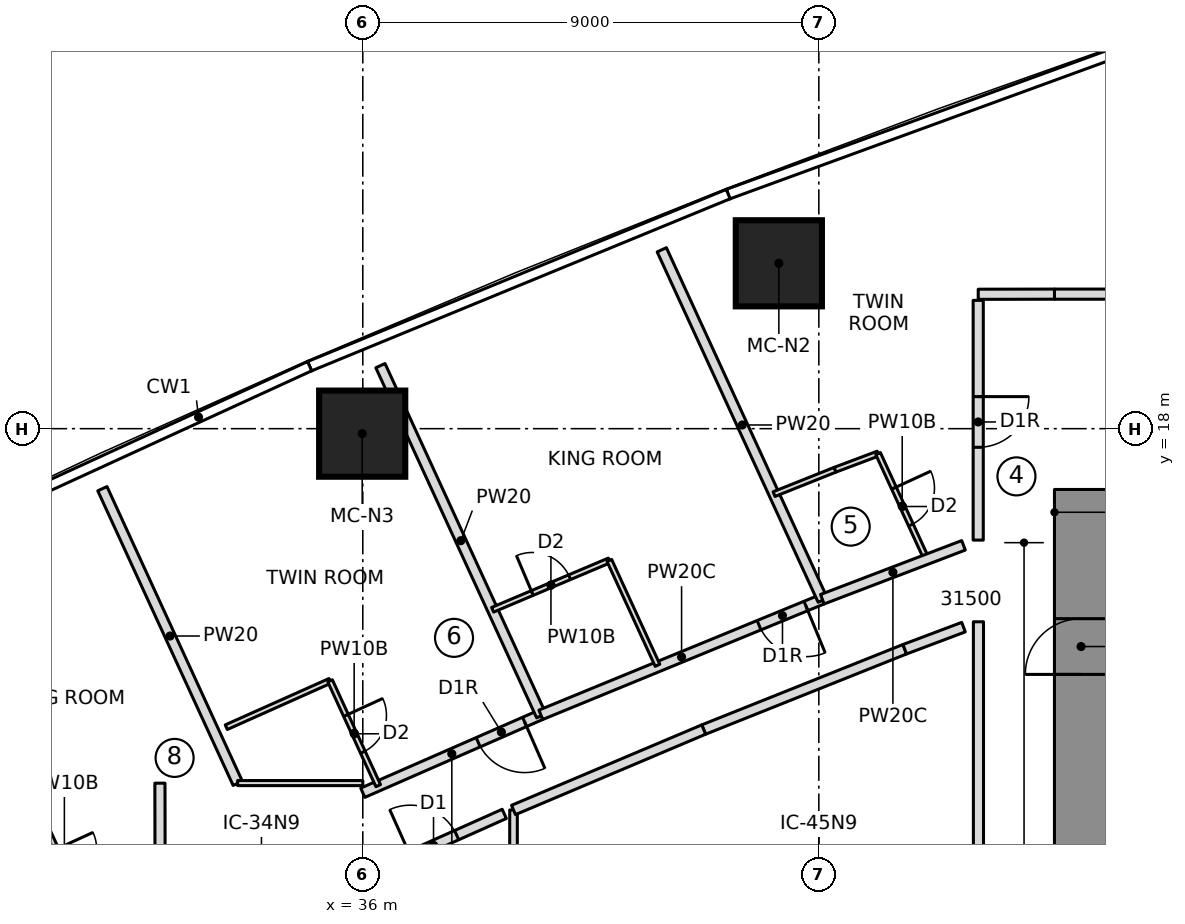
"""IFC4 building model, lengths in metres.
Left out: names, types, materials, properties, quantities, classifications, styles, units other than length and angle.
Written with IfcOpenShell. Run it as: python <this file> out.ifc"""

import sys

from ifc_helpers import new_model, si_unit, direction, frame, frame_2d, origin, origin_2d, place, context, subcontext, project, spatial, rectangle, extrude, element, fill, save


model = new_model("IFC4")
c1 = context("Model", 3, precision=1e-05, world=origin(), true_north=direction((0.0, 1.0)))
c2 = subcontext(c1, "Body", "Model", "MODEL_VIEW")
j1 = project(units=[si_unit("LENGTHUNIT", "METRE"), si_unit("PLANEANGLEUNIT", "RADIAN")], contexts=[c1])
p1 = place(None, origin())
s1 = spatial("IfcSite", under=j1, at=p1, CompositionType="ELEMENT")
p2 = place(p1, origin())
s2 = spatial("IfcBuilding", under=s1, at=p2, CompositionType="ELEMENT")
p3 = place(p2, frame((0.0, 0.0, 109.75)))
s3 = spatial("IfcBuildingStorey", under=s2, at=p3, CompositionType="ELEMENT", Elevation=109.75)
p4 = place(p3, frame((50.175, 6.65, 0.0), z_axis=(0.0, 0.0, 1.0), x_axis=(0.0, 1.0, 0.0)))
e1 = element("IfcWall", 1, at=p4, inside=s3, PredefinedType="SHEAR", context=c2, shape_type="SweptSolid", body=[
    extrude(rectangle(XDim=10.15, YDim=1.05, at=frame_2d((5.075, 0.0))), origin(), (0.0, 0.0, 1.0), 3.55),
])
p5 = place(p4, frame((6.5, 0.0, 0.0)))
e2 = element("IfcOpeningElement", 2, at=p5, cuts=e1, PredefinedType="OPENING", context=c2, shape_type="SweptSolid", body=[
    extrude(rectangle(XDim=1.1, YDim=2.1, at=frame_2d((0.55, 1.05))), frame((0.0, 0.535, 0.0), z_axis=(0.0, -1.0, 0.0), x_axis=(1.0, 0.0, 0.0)), (0.0, 0.0, 1.0), 1.07),
])
for number, where, z_axis, x_axis in (
    (3, (44.211, 21.264, 0.0), (0.0, 0.0, 1.0), (1.0, 0.0, 0.0)),
    (4, (35.988, 17.902, 0.0), (0.0, 0.0, 1.0), (1.0, 0.0, 0.0)),
):
    element("IfcColumn", number, at=place(p3, frame(where, z_axis=z_axis, x_axis=x_axis)), inside=s3, PredefinedType="COLUMN", context=c2, shape_type="SweptSolid", body=[
        extrude(rectangle(XDim=1.7, YDim=1.7, at=origin_2d()), origin(), (0.0, 0.0, 1.0), 3.55),
    ])
p6 = place(p3, frame((29.635, 10.38, 0.0), z_axis=(0.0, 0.0, 1.0), x_axis=(0.417466676952, -0.908692232626, 0.0)))
e5 = element("IfcWall", 5, at=p6, inside=s3, PredefinedType="PARTITIONING", context=c2, shape_type="SweptSolid", body=[
    extrude(rectangle(XDim=2.277, YDim=0.1, at=frame_2d((1.139, 0.0))), origin(), (0.0, 0.0, 1.0), 3.25),
])
p7 = place(p6, frame((0.75, 0.0, 0.0)))
e6 = element("IfcOpeningElement", 6, at=p7, cuts=e5, PredefinedType="OPENING", context=c2, shape_type="SweptSolid", body=[
    extrude(rectangle(XDim=0.8, YDim=2.1, at=frame_2d((0.4, 1.05))), frame((0.0, 0.06, 0.0), z_axis=(0.0, -1.0, 0.0), x_axis=(1.0, 0.0, 0.0)), (0.0, 0.0, 1.0), 0.12),
])
p8 = place(p3, frame((33.532, 11.0, 0.0), z_axis=(0.0, 0.0, 1.0), x_axis=(-0.417441426461, 0.908703832651, 0.0)))
e7 = element("IfcWall", 7, at=p8, inside=s3, PredefinedType="PARTITIONING", context=c2, shape_type="SweptSolid", body=[
    extrude(rectangle(XDim=6.399, YDim=0.2, at=frame_2d((3.2, 0.0))), origin(), (0.0, 0.0, 1.0), 3.25),
])
p9 = place(p3, frame((39.514, 12.353, 0.0), z_axis=(0.0, 0.0, 1.0), x_axis=(-0.916085742373, -0.400982434305, 0.0)))
e8 = element("IfcWall", 8, at=p9, inside=s3, PredefinedType="PARTITIONING", context=c2, shape_type="SweptSolid", body=[
    extrude(rectangle(XDim=3.836, YDim=0.2, at=frame_2d((1.918, 0.0))), origin(), (0.0, 0.0, 1.0), 3.25),
])
p10 = place(p9, frame((0.35, 0.0, 0.0)))
e9 = element("IfcOpeningElement", 9, at=p10, cuts=e8, PredefinedType="OPENING", context=c2, shape_type="SweptSolid", body=[
    extrude(rectangle(XDim=1.0, YDim=2.1, at=frame_2d((0.5, 1.05))), frame((0.0, 0.11, 0.0), z_axis=(0.0, -1.0, 0.0), x_axis=(1.0, 0.0, 0.0)), (0.0, 0.0, 1.0), 0.22),
])
p11 = place(p3, frame((33.306, 12.108, 0.0), z_axis=(0.0, 0.0, 1.0), x_axis=(0.913060453705, 0.407824236504, 0.0)))
e10 = element("IfcWall", 10, at=p11, inside=s3, PredefinedType="PARTITIONING", context=c2, shape_type="SweptSolid", body=[
    extrude(rectangle(XDim=2.243, YDim=0.1, at=frame_2d((1.122, 0.0))), origin(), (0.0, 0.0, 1.0), 3.25),
])
p12 = place(p3, frame((35.354, 13.023, 0.0), z_axis=(0.0, 0.0, 1.0), x_axis=(0.41750734959, -0.908673545911, 0.0)))
e11 = element("IfcWall", 11, at=p12, inside=s3, PredefinedType="PARTITIONING", context=c2, shape_type="SweptSolid", body=[
    extrude(rectangle(XDim=2.277, YDim=0.1, at=frame_2d((1.139, 0.0))), origin(), (0.0, 0.0, 1.0), 3.25),
])
p13 = place(p12, frame((0.75, 0.0, 0.0)))
e12 = element("IfcOpeningElement", 12, at=p13, cuts=e11, PredefinedType="OPENING", context=c2, shape_type="SweptSolid", body=[
    extrude(rectangle(XDim=0.8, YDim=2.1, at=frame_2d((0.4, 1.05))), frame((0.0, 0.06, 0.0), z_axis=(0.0, -1.0, 0.0), x_axis=(1.0, 0.0, 0.0)), (0.0, 0.0, 1.0), 0.12),
])
p14 = place(p3, frame((39.522, 12.334, 0.0), z_axis=(0.0, 0.0, 1.0), x_axis=(-0.417442847913, 0.908703179661, 0.0)))
e13 = element("IfcWall", 13, at=p14, inside=s3, PredefinedType="PARTITIONING", context=c2, shape_type="SweptSolid", body=[
    extrude(rectangle(XDim=7.604, YDim=0.2, at=frame_2d((3.802, 0.0))), origin(), (0.0, 0.0, 1.0), 3.25),
])
p15 = place(p3, frame((45.069, 14.634, 0.0), z_axis=(0.0, 0.0, 1.0), x_axis=(-0.925062421694, -0.379815107611, 0.0)))
e14 = element("IfcWall", 14, at=p15, inside=s3, PredefinedType="PARTITIONING", context=c2, shape_type="SweptSolid", body=[
    extrude(rectangle(XDim=6.005, YDim=0.2, at=frame_2d((3.002, 0.0))), origin(), (0.0, 0.0, 1.0), 3.25),
])
p16 = place(p15, frame((0.35, 0.0, 0.0)))
e15 = element("IfcOpeningElement", 15, at=p16, cuts=e14, PredefinedType="OPENING", context=c2, shape_type="SweptSolid", body=[
    extrude(rectangle(XDim=1.0, YDim=2.1, at=frame_2d((0.5, 1.05))), frame((0.0, 0.11, 0.0), z_axis=(0.0, -1.0, 0.0), x_axis=(1.0, 0.0, 0.0)), (0.0, 0.0, 1.0), 0.22),
])
p17 = place(p3, frame((38.562, 14.426, 0.0), z_axis=(0.0, 0.0, 1.0), x_axis=(0.921042675983, 0.38946166566, 0.0)))
e16 = element("IfcWall", 16, at=p17, inside=s3, PredefinedType="PARTITIONING", context=c2, shape_type="SweptSolid", body=[
    extrude(rectangle(XDim=2.501, YDim=0.1, at=frame_2d((1.25, 0.0))), origin(), (0.0, 0.0, 1.0), 3.25),
])
p18 = place(p17, frame((0.85, 0.0, 0.0)))
e17 = element("IfcOpeningElement", 17, at=p18, cuts=e16, PredefinedType="OPENING", context=c2, shape_type="SweptSolid", body=[
    extrude(rectangle(XDim=0.8, YDim=2.1, at=frame_2d((0.4, 1.05))), frame((0.0, 0.06, 0.0), z_axis=(0.0, -1.0, 0.0), x_axis=(1.0, 0.0, 0.0)), (0.0, 0.0, 1.0), 0.12),
])
p19 = place(p3, frame((40.865, 15.4, 0.0), z_axis=(0.0, 0.0, 1.0), x_axis=(0.417433204355, -0.908707609686, 0.0)))
e18 = element("IfcWall", 18, at=p19, inside=s3, PredefinedType="PARTITIONING", context=c2, shape_type="SweptSolid", body=[
    extrude(rectangle(XDim=2.278, YDim=0.1, at=frame_2d((1.139, 0.0))), origin(), (0.0, 0.0, 1.0), 3.25),
])
p20 = place(p3, frame((45.077, 14.615, 0.0), z_axis=(0.0, 0.0, 1.0), x_axis=(-0.417427858403, 0.908710065438, 0.0)))
e19 = element("IfcWall", 19, at=p20, inside=s3, PredefinedType="PARTITIONING", context=c2, shape_type="SweptSolid", body=[
    extrude(rectangle(XDim=7.61, YDim=0.2, at=frame_2d((3.805, 0.0))), origin(), (0.0, 0.0, 1.0), 3.25),
])
p21 = place(p3, frame((44.116, 16.708, 0.0), z_axis=(0.0, 0.0, 1.0), x_axis=(0.928593389657, 0.371098796393, 0.0)))
e20 = element("IfcWall", 20, at=p21, inside=s3, PredefinedType="PARTITIONING", context=c2, shape_type="SweptSolid", body=[
    extrude(rectangle(XDim=1.298, YDim=0.1, at=frame_2d((0.649, 0.0))), origin(), (0.0, 0.0, 1.0), 3.25),
])
p22 = place(p3, frame((45.321, 17.19, 0.0), z_axis=(0.0, 0.0, 1.0), x_axis=(0.935885332459, 0.352304760808, 0.0)))
e21 = element("IfcWall", 21, at=p22, inside=s3, PredefinedType="PARTITIONING", context=c2, shape_type="SweptSolid", body=[
    extrude(rectangle(XDim=0.906, YDim=0.1, at=frame_2d((0.453, 0.0))), origin(), (0.0, 0.0, 1.0), 3.25),
])
p23 = place(p3, frame((46.169, 17.509, 0.0), z_axis=(0.0, 0.0, 1.0), x_axis=(0.417409478396, -0.90871850831, 0.0)))
e22 = element("IfcWall", 22, at=p23, inside=s3, PredefinedType="PARTITIONING", context=c2, shape_type="SweptSolid", body=[
    extrude(rectangle(XDim=2.283, YDim=0.1, at=frame_2d((1.142, 0.0))), origin(), (0.0, 0.0, 1.0), 3.25),
])
p24 = place(p23, frame((0.75, 0.0, 0.0)))
e23 = element("IfcOpeningElement", 23, at=p24, cuts=e22, PredefinedType="OPENING", context=c2, shape_type="SweptSolid", body=[
    extrude(rectangle(XDim=0.8, YDim=2.1, at=frame_2d((0.4, 1.05))), frame((0.0, 0.06, 0.0), z_axis=(0.0, -1.0, 0.0), x_axis=(1.0, 0.0, 0.0)), (0.0, 0.0, 1.0), 0.12),
])
p25 = place(p3, frame((36.0, 9.15, 0.0), z_axis=(0.0, 0.0, 1.0), x_axis=(0.913029587861, 0.407893333716, 0.0)))
e24 = element("IfcWall", 24, at=p25, inside=s3, PredefinedType="PARTITIONING", context=c2, shape_type="SweptSolid", body=[
    extrude(rectangle(XDim=3.058, YDim=0.2, at=frame_2d((1.529, 0.0))), origin(), (0.0, 0.0, 1.0), 3.25),
])
p26 = place(p25, frame((1.029, 0.0, 0.0)))
e25 = element("IfcOpeningElement", 25, at=p26, cuts=e24, PredefinedType="OPENING", context=c2, shape_type="SweptSolid", body=[
    extrude(rectangle(XDim=1.0, YDim=2.1, at=frame_2d((0.5, 1.05))), frame((0.0, 0.11, 0.0), z_axis=(0.0, -1.0, 0.0), x_axis=(1.0, 0.0, 0.0)), (0.0, 0.0, 1.0), 0.22),
])
p27 = place(p3, frame((38.975, -10.474, 0.0), z_axis=(0.0, 0.0, 1.0), x_axis=(0.0, 1.0, 0.0)))
e26 = element("IfcWall", 26, at=p27, inside=s3, PredefinedType="PARTITIONING", context=c2, shape_type="SweptSolid", body=[
    extrude(rectangle(XDim=20.949, YDim=0.15, at=frame_2d((10.474, 0.0))), origin(), (0.0, 0.0, 1.0), 3.25),
])
p28 = place(p3, frame((42.728, 12.062, 0.0), z_axis=(0.0, 0.0, 1.0), x_axis=(0.928638161177, 0.370986745864, 0.0)))
e27 = element("IfcWall", 27, at=p28, inside=s3, PredefinedType="PARTITIONING", context=c2, shape_type="SweptSolid", body=[
    extrude(rectangle(XDim=4.273, YDim=0.2, at=frame_2d((2.136, 0.0))), origin(), (0.0, 0.0, 1.0), 3.25),
])
p29 = place(p3, frame((38.975, 10.474, 0.0), z_axis=(0.0, 0.0, 1.0), x_axis=(0.921030909625, 0.389489490891, 0.0)))
e28 = element("IfcWall", 28, at=p29, inside=s3, PredefinedType="PARTITIONING", context=c2, shape_type="SweptSolid", body=[
    extrude(rectangle(XDim=4.075, YDim=0.2, at=frame_2d((2.038, 0.0))), origin(), (0.0, 0.0, 1.0), 3.25),
])
p30 = place(p3, frame((54.625, 20.655, 0.0), z_axis=(0.0, 0.0, 1.0), x_axis=(-1.0, 0.0, 0.0)))
e29 = element("IfcWall", 29, at=p30, inside=s3, PredefinedType="PARTITIONING", context=c2, shape_type="SweptSolid", body=[
    extrude(rectangle(XDim=4.976, YDim=0.2, at=frame_2d((2.488, 0.0))), origin(), (0.0, 0.0, 1.0), 3.25),
])
p31 = place(p30, frame((1.988, 0.0, 0.0)))
e30 = element("IfcOpeningElement", 30, at=p31, cuts=e29, PredefinedType="OPENING", context=c2, shape_type="SweptSolid", body=[
    extrude(rectangle(XDim=1.5, YDim=2.1, at=frame_2d((0.75, 1.05))), frame((0.0, 0.11, 0.0), z_axis=(0.0, -1.0, 0.0), x_axis=(1.0, 0.0, 0.0)), (0.0, 0.0, 1.0), 0.22),
])
p32 = place(p3, frame((36.0, 11.005, 0.0), z_axis=(0.0, 0.0, 1.0), x_axis=(-1.0, 0.0, 0.0)))
e31 = element("IfcWall", 31, at=p32, inside=s3, PredefinedType="PARTITIONING", context=c2, shape_type="SweptSolid", body=[
    extrude(rectangle(XDim=2.47, YDim=0.1, at=frame_2d((1.235, 0.0))), origin(), (0.0, 0.0, 1.0), 3.25),
])
p33 = place(p3, frame((47.855, 15.698, 0.0), z_axis=(0.0, 0.0, 1.0), x_axis=(-0.934199537442, -0.35675092746, 0.0)))
e32 = element("IfcWall", 32, at=p33, inside=s3, PredefinedType="PARTITIONING", context=c2, shape_type="SweptSolid", body=[
    extrude(rectangle(XDim=2.982, YDim=0.2, at=frame_2d((1.491, 0.0))), origin(), (0.0, 0.0, 1.0), 3.25),
])
p34 = place(p3, frame((46.696, 13.647, 0.0), z_axis=(0.0, 0.0, 1.0), x_axis=(0.935907269358, 0.352246480696, 0.0)))
e33 = element("IfcWall", 33, at=p34, inside=s3, PredefinedType="PARTITIONING", context=c2, shape_type="SweptSolid", body=[
    extrude(rectangle(XDim=1.239, YDim=0.2, at=frame_2d((0.619, 0.0))), origin(), (0.0, 0.0, 1.0), 3.25),
])
p35 = place(p3, frame((48.15, 14.189, 0.0), z_axis=(0.0, 0.0, 1.0), x_axis=(0.0, -1.0, 0.0)))
e34 = element("IfcWall", 34, at=p35, inside=s3, PredefinedType="PARTITIONING", context=c2, shape_type="SweptSolid", body=[
    extrude(rectangle(XDim=28.377, YDim=0.2, at=frame_2d((14.189, 0.0))), origin(), (0.0, 0.0, 1.0), 3.25),
])
p36 = place(p3, frame((31.997, 11.003, 0.0), z_axis=(0.0, 0.0, 1.0), x_axis=(0.001683296882, -0.999998583255, 0.0)))
e35 = element("IfcWall", 35, at=p36, inside=s3, PredefinedType="PARTITIONING", context=c2, shape_type="SweptSolid", body=[
    extrude(rectangle(XDim=2.031, YDim=0.2, at=frame_2d((1.015, 0.0))), origin(), (0.0, 0.0, 1.0), 3.25),
])
p37 = place(p3, frame((49.65, 20.655, 0.0), z_axis=(0.0, 0.0, 1.0), x_axis=(-0.999998406651, -0.001785131852, 0.0)))
e36 = element("IfcWall", 36, at=p37, inside=s3, PredefinedType="PARTITIONING", context=c2, shape_type="SweptSolid", body=[
    extrude(rectangle(XDim=1.504, YDim=0.2, at=frame_2d((0.752, 0.0))), origin(), (0.0, 0.0, 1.0), 3.25),
])
p38 = place(p3, frame((48.146, 20.532, 0.0), z_axis=(0.0, 0.0, 1.0), x_axis=(-5.1594263e-05, -0.999999998669, 0.0)))
e37 = element("IfcWall", 37, at=p38, inside=s3, PredefinedType="PARTITIONING", context=c2, shape_type="SweptSolid", body=[
    extrude(rectangle(XDim=4.732, YDim=0.2, at=frame_2d((2.366, 0.0))), origin(), (0.0, 0.0, 1.0), 3.25),
])
p39 = place(p38, frame((1.9, 0.0, 0.0)))
e38 = element("IfcOpeningElement", 38, at=p39, cuts=e37, PredefinedType="OPENING", context=c2, shape_type="SweptSolid", body=[
    extrude(rectangle(XDim=1.0, YDim=2.1, at=frame_2d((0.5, 1.05))), frame((0.0, 0.11, 0.0), z_axis=(0.0, -1.0, 0.0), x_axis=(1.0, 0.0, 0.0)), (0.0, 0.0, 1.0), 0.22),
])
p40 = place(p13, origin())
e39 = element("IfcDoor", 39, at=p40, inside=s3, OperationType="SINGLE_SWING_LEFT", PredefinedType="DOOR", context=c2, shape_type="SweptSolid", body=[
    extrude(rectangle(XDim=0.8, YDim=2.1, at=frame_2d((0.4, 1.05))), frame((0.0, 0.025, 0.0), z_axis=(0.0, -1.0, 0.0), x_axis=(1.0, 0.0, 0.0)), (0.0, 0.0, 1.0), 0.05),
])
fill(e12, e39)
p41 = place(p10, origin())
e40 = element("IfcDoor", 40, at=p41, inside=s3, OperationType="SINGLE_SWING_RIGHT", PredefinedType="DOOR", context=c2, shape_type="SweptSolid", body=[
    extrude(rectangle(XDim=1.0, YDim=2.1, at=frame_2d((0.5, 1.05))), frame((0.0, 0.025, 0.0), z_axis=(0.0, -1.0, 0.0), x_axis=(1.0, 0.0, 0.0)), (0.0, 0.0, 1.0), 0.05),
])
fill(e9, e40)
p42 = place(p18, origin())
e41 = element("IfcDoor", 41, at=p42, inside=s3, OperationType="SINGLE_SWING_LEFT", PredefinedType="DOOR", context=c2, shape_type="SweptSolid", body=[
    extrude(rectangle(XDim=0.8, YDim=2.1, at=frame_2d((0.4, 1.05))), frame((0.0, 0.025, 0.0), z_axis=(0.0, -1.0, 0.0), x_axis=(1.0, 0.0, 0.0)), (0.0, 0.0, 1.0), 0.05),
])
fill(e17, e41)
p43 = place(p16, origin())
e42 = element("IfcDoor", 42, at=p43, inside=s3, OperationType="SINGLE_SWING_RIGHT", PredefinedType="DOOR", context=c2, shape_type="SweptSolid", body=[
    extrude(rectangle(XDim=1.0, YDim=2.1, at=frame_2d((0.5, 1.05))), frame((0.0, 0.025, 0.0), z_axis=(0.0, -1.0, 0.0), x_axis=(1.0, 0.0, 0.0)), (0.0, 0.0, 1.0), 0.05),
])
fill(e15, e42)
p44 = place(p24, origin())
e43 = element("IfcDoor", 43, at=p44, inside=s3, OperationType="SINGLE_SWING_LEFT", PredefinedType="DOOR", context=c2, shape_type="SweptSolid", body=[
    extrude(rectangle(XDim=0.8, YDim=2.1, at=frame_2d((0.4, 1.05))), frame((0.0, 0.025, 0.0), z_axis=(0.0, -1.0, 0.0), x_axis=(1.0, 0.0, 0.0)), (0.0, 0.0, 1.0), 0.05),
])
fill(e23, e43)
p45 = place(p26, origin())
e44 = element("IfcDoor", 44, at=p45, inside=s3, OperationType="SINGLE_SWING_LEFT", PredefinedType="DOOR", context=c2, shape_type="SweptSolid", body=[
    extrude(rectangle(XDim=1.0, YDim=2.1, at=frame_2d((0.5, 1.05))), frame((0.0, 0.025, 0.0), z_axis=(0.0, -1.0, 0.0), x_axis=(1.0, 0.0, 0.0)), (0.0, 0.0, 1.0), 0.05),
])
fill(e25, e44)
p46 = place(p39, origin())
e45 = element("IfcDoor", 45, at=p46, inside=s3, OperationType="SINGLE_SWING_RIGHT", PredefinedType="DOOR", context=c2, shape_type="SweptSolid", body=[
    extrude(rectangle(XDim=1.0, YDim=2.1, at=frame_2d((0.5, 1.05))), frame((0.0, 0.025, 0.0), z_axis=(0.0, -1.0, 0.0), x_axis=(1.0, 0.0, 0.0)), (0.0, 0.0, 1.0), 0.05),
])
fill(e38, e45)
p47 = place(p5, origin())
e46 = element("IfcDoor", 46, at=p47, inside=s3, OperationType="SINGLE_SWING_RIGHT", PredefinedType="DOOR", context=c2, shape_type="SweptSolid", body=[
    extrude(rectangle(XDim=1.1, YDim=2.1, at=frame_2d((0.55, 1.05))), frame((0.0, 0.025, 0.0), z_axis=(0.0, -1.0, 0.0), x_axis=(1.0, 0.0, 0.0)), (0.0, 0.0, 1.0), 0.05),
])
fill(e2, e46)
save(model, sys.argv[1])
